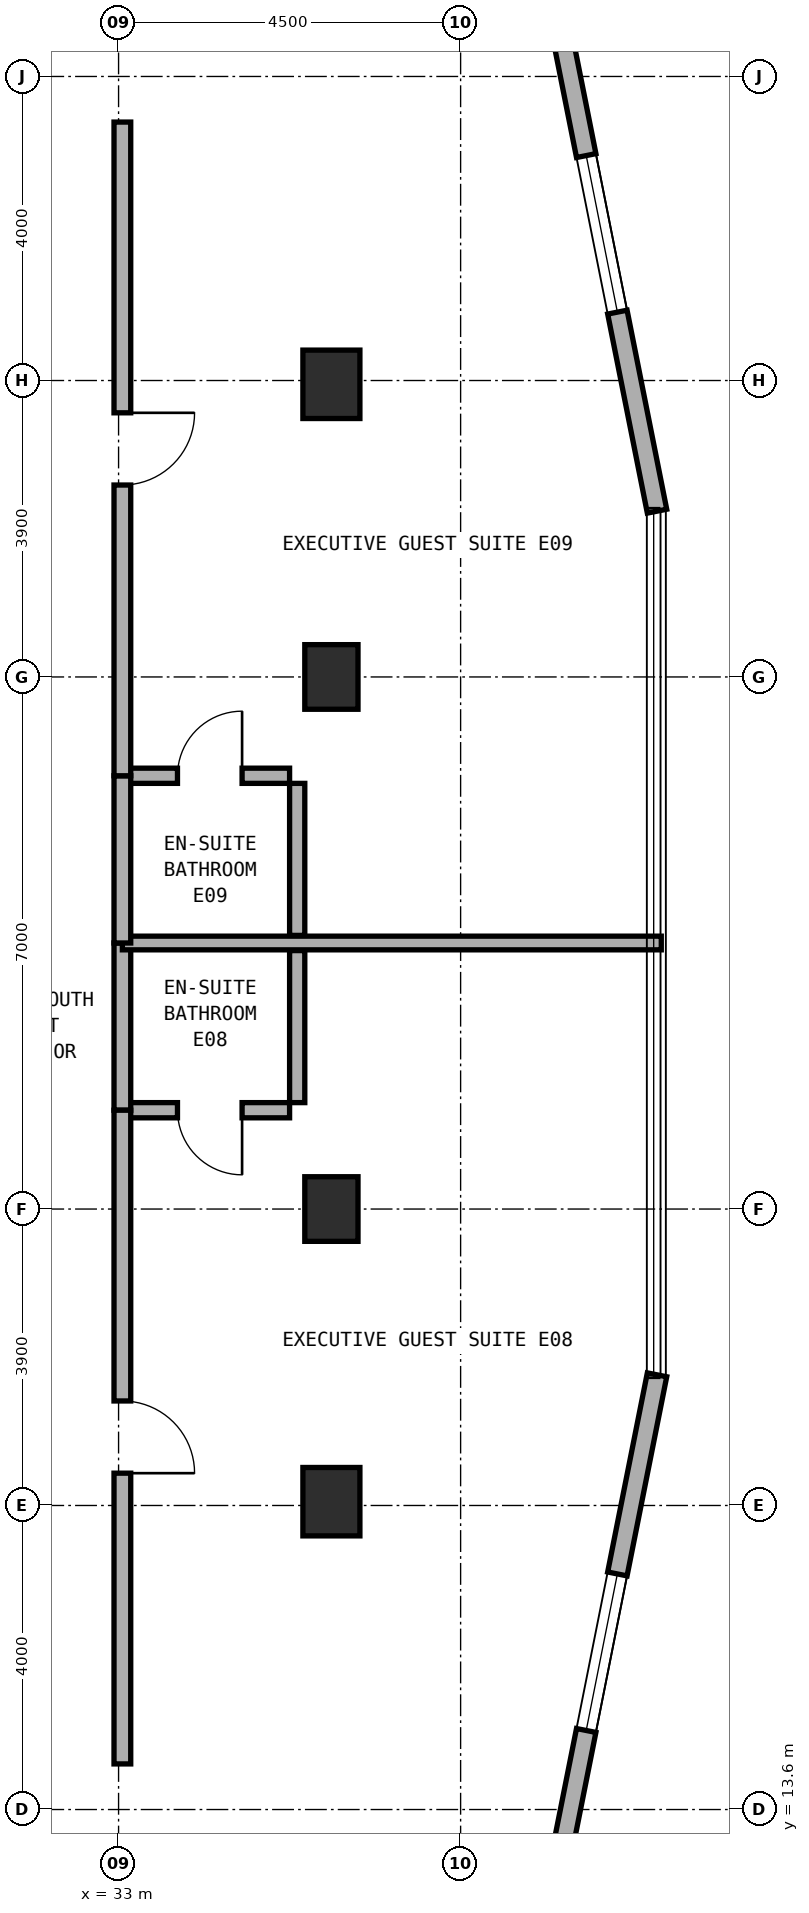
"""IFC4 building model, lengths in metres.
Left out: names, types, materials, properties, quantities, classifications, styles, units other than length and angle.
Written with IfcOpenShell. Run it as: python <this file> out.ifc"""

import sys

from ifc_helpers import new_model, si_unit, direction, frame, frame_2d, origin, origin_2d, place, context, subcontext, project, spatial, rectangle, extrude, element, fill, save


model = new_model("IFC4")
c1 = context("Model", 3, precision=1e-05, world=origin(), true_north=direction((0.0, 1.0)))
c2 = subcontext(c1, "Body", "Model", "MODEL_VIEW")
j1 = project(units=[si_unit("LENGTHUNIT", "METRE"), si_unit("PLANEANGLEUNIT", "RADIAN")], contexts=[c1])
p1 = place(None, origin())
s1 = spatial("IfcSite", under=j1, at=p1, CompositionType="ELEMENT")
p2 = place(p1, origin())
s2 = spatial("IfcBuilding", under=s1, at=p2, CompositionType="ELEMENT")
p3 = place(p2, frame((0.0, 0.0, 235.1)))
s3 = spatial("IfcBuildingStorey", under=s2, at=p3, CompositionType="ELEMENT", Elevation=235.1)
for number, where, z_axis, x_axis in (
    (1, (35.8, 21.5, 0.0), (0.0, 0.0, 1.0), (1.0, 0.0, 0.0)),
    (2, (35.8, 28.5, 0.0), (0.0, 0.0, 1.0), (1.0, 0.0, 0.0)),
):
    element("IfcColumn", number, at=place(p3, frame(where, z_axis=z_axis, x_axis=x_axis)), inside=s3, PredefinedType="COLUMN", context=c2, shape_type="SweptSolid", body=[
        extrude(rectangle(XDim=0.7, YDim=0.85, at=origin_2d()), origin(), (0.0, 0.0, 1.0), 3.6),
    ])
for number, where, z_axis, x_axis in (
    (3, (35.8, 17.65, 0.0), (0.0, 0.0, 1.0), (1.0, 0.0, 0.0)),
    (4, (35.8, 32.35, 0.0), (0.0, 0.0, 1.0), (1.0, 0.0, 0.0)),
):
    element("IfcColumn", number, at=place(p3, frame(where, z_axis=z_axis, x_axis=x_axis)), inside=s3, PredefinedType="COLUMN", context=c2, shape_type="SweptSolid", body=[
        extrude(rectangle(XDim=0.75, YDim=0.9, at=origin_2d()), origin(), (0.0, 0.0, 1.0), 3.6),
    ])
p4 = place(p3, frame((38.371, 10.717, 0.0), z_axis=(0.0, 0.0, 1.0), x_axis=(0.195291715883, 0.980745199176, 0.0)))
e5 = element("IfcWall", 5, at=p4, inside=s3, PredefinedType="STANDARD", context=c2, shape_type="SweptSolid", body=[
    extrude(rectangle(XDim=8.771, YDim=0.26, at=frame_2d((4.385, 0.0))), origin(), (0.0, 0.0, 1.0), 3.28),
])
p5 = place(p4, frame((4.0, 0.0, 0.85)))
e6 = element("IfcOpeningElement", 6, at=p5, cuts=e5, PredefinedType="OPENING", context=c2, shape_type="SweptSolid", body=[
    extrude(rectangle(XDim=2.1, YDim=1.5, at=frame_2d((1.05, 0.75))), frame((0.0, 0.14, 0.0), z_axis=(0.0, -1.0, 0.0), x_axis=(1.0, 0.0, 0.0)), (0.0, 0.0, 1.0), 0.28),
])
p6 = place(p3, frame((40.084, 30.681, 0.0), z_axis=(0.0, 0.0, 1.0), x_axis=(-0.195291715883, 0.980745199176, 0.0)))
e7 = element("IfcWall", 7, at=p6, inside=s3, PredefinedType="STANDARD", context=c2, shape_type="SweptSolid", body=[
    extrude(rectangle(XDim=8.771, YDim=0.26, at=frame_2d((4.385, 0.0))), origin(), (0.0, 0.0, 1.0), 3.28),
])
p7 = place(p6, frame((2.67, 0.0, 0.85)))
e8 = element("IfcOpeningElement", 8, at=p7, cuts=e7, PredefinedType="OPENING", context=c2, shape_type="SweptSolid", body=[
    extrude(rectangle(XDim=2.1, YDim=1.5, at=frame_2d((1.05, 0.75))), frame((0.0, 0.14, 0.0), z_axis=(0.0, -1.0, 0.0), x_axis=(1.0, 0.0, 0.0)), (0.0, 0.0, 1.0), 0.28),
])
p8 = place(p3, frame((33.15, 22.8, 0.0), z_axis=(0.0, 0.0, 1.0), x_axis=(1.0, 0.0, 0.0)))
e9 = element("IfcWall", 9, at=p8, inside=s3, PredefinedType="PLUMBINGWALL", context=c2, shape_type="SweptSolid", body=[
    extrude(rectangle(XDim=2.1, YDim=0.2, at=frame_2d((1.05, 0.0))), origin(), (0.0, 0.0, 1.0), 3.28),
])
p9 = place(p8, frame((0.625, 0.0, 0.0)))
e10 = element("IfcOpeningElement", 10, at=p9, cuts=e9, PredefinedType="OPENING", context=c2, shape_type="SweptSolid", body=[
    extrude(rectangle(XDim=0.85, YDim=2.1, at=frame_2d((0.425, 1.05))), frame((0.0, 0.11, 0.0), z_axis=(0.0, -1.0, 0.0), x_axis=(1.0, 0.0, 0.0)), (0.0, 0.0, 1.0), 0.22),
])
p10 = place(p3, frame((35.35, 22.9, 0.0), z_axis=(0.0, 0.0, 1.0), x_axis=(0.0, 1.0, 0.0)))
e11 = element("IfcWall", 11, at=p10, inside=s3, PredefinedType="PLUMBINGWALL", context=c2, shape_type="SweptSolid", body=[
    extrude(rectangle(XDim=2.0, YDim=0.2, at=frame_2d((1.0, 0.0))), origin(), (0.0, 0.0, 1.0), 3.28),
])
p11 = place(p3, frame((33.05, 22.8, 0.0), z_axis=(0.0, 0.0, 1.0), x_axis=(0.0, 1.0, 0.0)))
e12 = element("IfcWall", 12, at=p11, inside=s3, PredefinedType="SOLIDWALL", context=c2, shape_type="SweptSolid", body=[
    extrude(rectangle(XDim=2.2, YDim=0.22, at=frame_2d((1.1, 0.0))), origin(), (0.0, 0.0, 1.0), 3.28),
])
p12 = place(p3, frame((33.05, 14.2, 0.0), z_axis=(0.0, 0.0, 1.0), x_axis=(0.0, 1.0, 0.0)))
e13 = element("IfcWall", 13, at=p12, inside=s3, PredefinedType="SOLIDWALL", context=c2, shape_type="SweptSolid", body=[
    extrude(rectangle(XDim=8.6, YDim=0.22, at=frame_2d((4.3, 0.0))), origin(), (0.0, 0.0, 1.0), 2.705),
])
p13 = place(p12, frame((3.825, 0.0, 0.0)))
e14 = element("IfcOpeningElement", 14, at=p13, cuts=e13, PredefinedType="OPENING", context=c2, shape_type="SweptSolid", body=[
    extrude(rectangle(XDim=0.95, YDim=2.1, at=frame_2d((0.475, 1.05))), frame((0.0, 0.12, 0.0), z_axis=(0.0, -1.0, 0.0), x_axis=(1.0, 0.0, 0.0)), (0.0, 0.0, 1.0), 0.24),
])
p14 = place(p3, frame((33.05, 25.0, 0.0), z_axis=(0.0, 0.0, 1.0), x_axis=(1.0, 0.0, 0.0)))
e15 = element("IfcWall", 15, at=p14, inside=s3, PredefinedType="SOLIDWALL", context=c2, shape_type="SweptSolid", body=[
    extrude(rectangle(XDim=7.09, YDim=0.18, at=frame_2d((3.545, 0.0))), origin(), (0.0, 0.0, 1.0), 2.975),
])
p15 = place(p3, frame((33.15, 27.2, 0.0), z_axis=(0.0, 0.0, 1.0), x_axis=(1.0, 0.0, 0.0)))
e16 = element("IfcWall", 16, at=p15, inside=s3, PredefinedType="PLUMBINGWALL", context=c2, shape_type="SweptSolid", body=[
    extrude(rectangle(XDim=2.1, YDim=0.2, at=frame_2d((1.05, 0.0))), origin(), (0.0, 0.0, 1.0), 3.28),
])
p16 = place(p15, frame((0.625, 0.0, 0.0)))
e17 = element("IfcOpeningElement", 17, at=p16, cuts=e16, PredefinedType="OPENING", context=c2, shape_type="SweptSolid", body=[
    extrude(rectangle(XDim=0.85, YDim=2.1, at=frame_2d((0.425, 1.05))), frame((0.0, 0.11, 0.0), z_axis=(0.0, -1.0, 0.0), x_axis=(1.0, 0.0, 0.0)), (0.0, 0.0, 1.0), 0.22),
])
p17 = place(p3, frame((35.35, 25.1, 0.0), z_axis=(0.0, 0.0, 1.0), x_axis=(0.0, 1.0, 0.0)))
e18 = element("IfcWall", 18, at=p17, inside=s3, PredefinedType="PLUMBINGWALL", context=c2, shape_type="SweptSolid", body=[
    extrude(rectangle(XDim=2.0, YDim=0.2, at=frame_2d((1.0, 0.0))), origin(), (0.0, 0.0, 1.0), 3.28),
])
p18 = place(p3, frame((33.05, 25.0, 0.0), z_axis=(0.0, 0.0, 1.0), x_axis=(0.0, 1.0, 0.0)))
e19 = element("IfcWall", 19, at=p18, inside=s3, PredefinedType="SOLIDWALL", context=c2, shape_type="SweptSolid", body=[
    extrude(rectangle(XDim=2.2, YDim=0.22, at=frame_2d((1.1, 0.0))), origin(), (0.0, 0.0, 1.0), 3.28),
])
p19 = place(p3, frame((33.05, 27.2, 0.0), z_axis=(0.0, 0.0, 1.0), x_axis=(0.0, 1.0, 0.0)))
e20 = element("IfcWall", 20, at=p19, inside=s3, PredefinedType="SOLIDWALL", context=c2, shape_type="SweptSolid", body=[
    extrude(rectangle(XDim=8.6, YDim=0.22, at=frame_2d((4.3, 0.0))), origin(), (0.0, 0.0, 1.0), 2.705),
])
p20 = place(p19, frame((3.825, 0.0, 0.0)))
e21 = element("IfcOpeningElement", 21, at=p20, cuts=e20, PredefinedType="OPENING", context=c2, shape_type="SweptSolid", body=[
    extrude(rectangle(XDim=0.95, YDim=2.1, at=frame_2d((0.475, 1.05))), frame((0.0, 0.12, 0.0), z_axis=(0.0, -1.0, 0.0), x_axis=(1.0, 0.0, 0.0)), (0.0, 0.0, 1.0), 0.24),
])
p21 = place(p5, origin())
e22 = element("IfcWindow", 22, at=p21, inside=s3, PartitioningType="SINGLE_PANEL", PredefinedType="WINDOW", context=c2, shape_type="SweptSolid", body=[
    extrude(rectangle(XDim=2.1, YDim=1.5, at=frame_2d((1.05, 0.75))), frame((0.0, 0.03, 0.0), z_axis=(0.0, -1.0, 0.0), x_axis=(1.0, 0.0, 0.0)), (0.0, 0.0, 1.0), 0.06),
])
fill(e6, e22)
p22 = place(p7, origin())
e23 = element("IfcWindow", 23, at=p22, inside=s3, PartitioningType="SINGLE_PANEL", PredefinedType="WINDOW", context=c2, shape_type="SweptSolid", body=[
    extrude(rectangle(XDim=2.1, YDim=1.5, at=frame_2d((1.05, 0.75))), frame((0.0, 0.03, 0.0), z_axis=(0.0, -1.0, 0.0), x_axis=(1.0, 0.0, 0.0)), (0.0, 0.0, 1.0), 0.06),
])
fill(e8, e23)
p23 = place(p9, frame((0.85, 0.0, 0.0), z_axis=(0.0, 0.0, 1.0), x_axis=(-1.0, 0.0, 0.0)))
e24 = element("IfcDoor", 24, at=p23, inside=s3, OperationType="SINGLE_SWING_LEFT", PredefinedType="DOOR", context=c2, shape_type="SweptSolid", body=[
    extrude(rectangle(XDim=0.85, YDim=2.1, at=frame_2d((0.425, 1.05))), frame((0.0, 0.025, 0.0), z_axis=(0.0, -1.0, 0.0), x_axis=(1.0, 0.0, 0.0)), (0.0, 0.0, 1.0), 0.05),
])
fill(e10, e24)
p24 = place(p13, frame((0.95, 0.0, 0.0), z_axis=(0.0, 0.0, 1.0), x_axis=(-1.0, 0.0, 0.0)))
e25 = element("IfcDoor", 25, at=p24, inside=s3, OperationType="SINGLE_SWING_RIGHT", PredefinedType="DOOR", context=c2, shape_type="SweptSolid", body=[
    extrude(rectangle(XDim=0.95, YDim=2.1, at=frame_2d((0.475, 1.05))), frame((0.0, 0.025, 0.0), z_axis=(0.0, -1.0, 0.0), x_axis=(1.0, 0.0, 0.0)), (0.0, 0.0, 1.0), 0.05),
])
fill(e14, e25)
p25 = place(p16, origin())
e26 = element("IfcDoor", 26, at=p25, inside=s3, OperationType="SINGLE_SWING_RIGHT", PredefinedType="DOOR", context=c2, shape_type="SweptSolid", body=[
    extrude(rectangle(XDim=0.85, YDim=2.1, at=frame_2d((0.425, 1.05))), frame((0.0, 0.025, 0.0), z_axis=(0.0, -1.0, 0.0), x_axis=(1.0, 0.0, 0.0)), (0.0, 0.0, 1.0), 0.05),
])
fill(e17, e26)
p26 = place(p20, frame((0.95, 0.0, 0.0), z_axis=(0.0, 0.0, 1.0), x_axis=(-1.0, 0.0, 0.0)))
e27 = element("IfcDoor", 27, at=p26, inside=s3, OperationType="SINGLE_SWING_LEFT", PredefinedType="DOOR", context=c2, shape_type="SweptSolid", body=[
    extrude(rectangle(XDim=0.95, YDim=2.1, at=frame_2d((0.475, 1.05))), frame((0.0, 0.025, 0.0), z_axis=(0.0, -1.0, 0.0), x_axis=(1.0, 0.0, 0.0)), (0.0, 0.0, 1.0), 0.05),
])
fill(e21, e27)
save(model, sys.argv[1])
